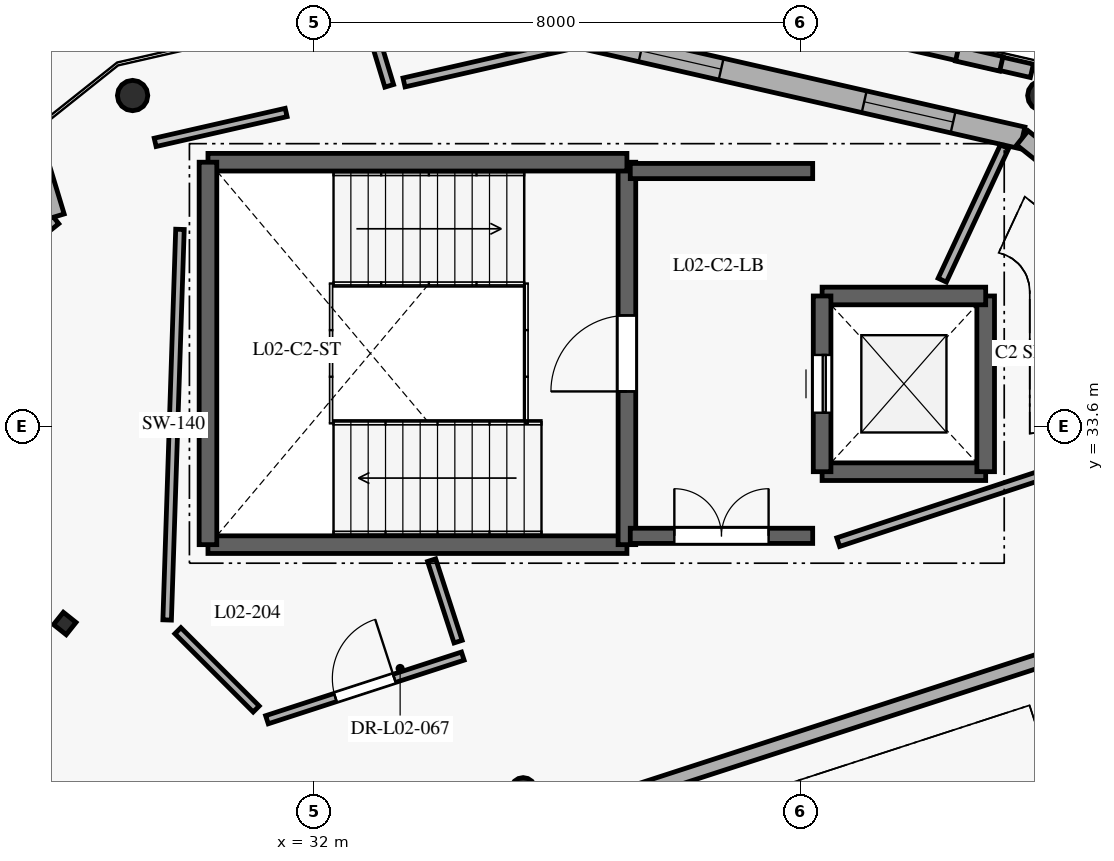
"""IFC4 building model, lengths in metres.
Left out: names, types, materials, properties, quantities, classifications, styles, units other than length and angle.
Written with IfcOpenShell. Run it as: python <this file> out.ifc"""

import sys

from ifc_helpers import new_model, si_unit, direction, frame, frame_2d, origin, origin_2d, place, context, subcontext, project, spatial, rectangle, circle, hollow_circle, i_section, extrude, element, fill, save


model = new_model("IFC4")
c1 = context("Model", 3, precision=1e-05, world=origin(), true_north=direction((0.0, 1.0)))
c2 = subcontext(c1, "Body", "Model", "MODEL_VIEW")
j1 = project(units=[si_unit("LENGTHUNIT", "METRE"), si_unit("PLANEANGLEUNIT", "RADIAN")], contexts=[c1])
p1 = place(None, origin())
s1 = spatial("IfcSite", under=j1, at=p1, CompositionType="ELEMENT")
p2 = place(p1, origin())
s2 = spatial("IfcBuilding", under=s1, at=p2, CompositionType="ELEMENT")
p3 = place(p2, frame((0.0, 0.0, 8.4)))
s3 = spatial("IfcBuildingStorey", under=s2, at=p3, CompositionType="ELEMENT", Elevation=8.4)
p4 = place(p3, frame((35.439, 27.621, 0.0), z_axis=(0.0, 0.0, 1.0), x_axis=(0.951056516295, 0.309016994375, 0.0)))
e1 = element("IfcColumn", 1, at=p4, inside=s3, PredefinedType="COLUMN", context=c2, shape_type="SweptSolid", body=[
    extrude(hollow_circle(Radius=0.203, WallThickness=0.016, at=origin_2d()), origin(), (0.0, 0.0, 1.0), 4.2),
])
for number, where, z_axis, x_axis in (
    (2, (43.985, 39.042, 0.0), (0.0, 0.0, 1.0), (-0.901, 0.434, 0.0)),
    (3, (29.015, 39.042, 0.0), (0.0, 0.0, 1.0), (-0.901, -0.434, 0.0)),
):
    element("IfcColumn", number, at=place(p3, frame(where, z_axis=z_axis, x_axis=x_axis)), inside=s3, PredefinedType="COLUMN", context=c2, shape_type="SweptSolid", body=[
        extrude(circle(Radius=0.25, at=origin_2d()), origin(), (0.0, 0.0, 1.0), 4.2),
    ])
p5 = place(p3, frame((27.9, 30.358, 0.0), z_axis=(0.0, 0.0, 1.0), x_axis=(-0.623470308046, -0.781847027868, 0.0)))
e4 = element("IfcColumn", 4, at=p5, inside=s3, PredefinedType="COLUMN", context=c2, shape_type="SweptSolid", body=[
    extrude(i_section(OverallWidth=0.259, OverallDepth=0.267, WebThickness=0.013, FlangeThickness=0.021, FilletRadius=0.013, at=origin_2d()), origin(), (0.0, 0.0, 1.0), 4.2),
])
p6 = place(p3, frame((23.618, 33.773, 0.0), z_axis=(0.0, 0.0, 1.0), x_axis=(0.781826790272, 0.623495685641, 0.0)))
e5 = element("IfcWall", 5, at=p6, inside=s3, PredefinedType="SOLIDWALL", context=c2, shape_type="SweptSolid", body=[
    extrude(rectangle(XDim=5.241, YDim=0.275, at=frame_2d((2.621, 0.0))), origin(), (0.0, 0.0, 1.0), 3.94),
])
p7 = place(p6, frame((0.35, 0.0, 0.85)))
e6 = element("IfcOpeningElement", 6, at=p7, cuts=e5, PredefinedType="OPENING", context=c2, shape_type="SweptSolid", body=[
    extrude(rectangle(XDim=0.85, YDim=1.4, at=frame_2d((0.425, 0.7))), frame((0.0, 0.147, 0.0), z_axis=(0.0, -1.0, 0.0), x_axis=(1.0, 0.0, 0.0)), (0.0, 0.0, 1.0), 0.295),
])
p8 = place(p3, frame((27.716, 37.041, 0.0), z_axis=(0.0, 0.0, 1.0), x_axis=(-0.290004516903, 0.957025276665, 0.0)))
e7 = element("IfcWall", 7, at=p8, inside=s3, PredefinedType="SOLIDWALL", context=c2, shape_type="SweptSolid", body=[
    extrude(rectangle(XDim=7.062, YDim=0.365, at=frame_2d((3.531, 0.0))), origin(), (0.0, 0.0, 1.0), 3.94),
])
p9 = place(p8, frame((1.115, 0.0, 0.85)))
e8 = element("IfcOpeningElement", 8, at=p9, cuts=e7, PredefinedType="OPENING", context=c2, shape_type="SweptSolid", body=[
    extrude(rectangle(XDim=1.3, YDim=1.8, at=frame_2d((0.65, 0.9))), frame((0.0, 0.192, 0.0), z_axis=(0.0, -1.0, 0.0), x_axis=(1.0, 0.0, 0.0)), (0.0, 0.0, 1.0), 0.385),
])
p10 = place(p8, frame((4.572, 0.0, 0.85)))
e9 = element("IfcOpeningElement", 9, at=p10, cuts=e7, PredefinedType="OPENING", context=c2, shape_type="SweptSolid", body=[
    extrude(rectangle(XDim=1.45, YDim=1.8, at=frame_2d((0.725, 0.9))), frame((0.0, 0.192, 0.0), z_axis=(0.0, -1.0, 0.0), x_axis=(1.0, 0.0, 0.0)), (0.0, 0.0, 1.0), 0.385),
])
p11 = place(p3, frame((36.165, 40.053, 0.0), z_axis=(0.0, 0.0, 1.0), x_axis=(0.974926557855, -0.222526867568, 0.0)))
e10 = element("IfcWall", 10, at=p11, inside=s3, PredefinedType="SOLIDWALL", context=c2, shape_type="SweptSolid", body=[
    extrude(rectangle(XDim=7.677, YDim=0.365, at=frame_2d((3.838, 0.0))), origin(), (0.0, 0.0, 1.0), 3.94),
])
p12 = place(p11, frame((1.244, 0.0, 0.85)))
e11 = element("IfcOpeningElement", 11, at=p12, cuts=e10, PredefinedType="OPENING", context=c2, shape_type="SweptSolid", body=[
    extrude(rectangle(XDim=1.35, YDim=1.6, at=frame_2d((0.675, 0.8))), frame((0.0, 0.192, 0.0), z_axis=(0.0, -1.0, 0.0), x_axis=(1.0, 0.0, 0.0)), (0.0, 0.0, 1.0), 0.385),
])
p13 = place(p11, frame((5.008, 0.0, 0.85)))
e12 = element("IfcOpeningElement", 12, at=p13, cuts=e10, PredefinedType="OPENING", context=c2, shape_type="SweptSolid", body=[
    extrude(rectangle(XDim=1.5, YDim=1.6, at=frame_2d((0.75, 0.8))), frame((0.0, 0.192, 0.0), z_axis=(0.0, -1.0, 0.0), x_axis=(1.0, 0.0, 0.0)), (0.0, 0.0, 1.0), 0.385),
])
p14 = place(p3, frame((43.649, 38.345, 0.0), z_axis=(0.0, 0.0, 1.0), x_axis=(0.781819636461, -0.623504655992, 0.0)))
e13 = element("IfcWall", 13, at=p14, inside=s3, PredefinedType="SOLIDWALL", context=c2, shape_type="SweptSolid", body=[
    extrude(rectangle(XDim=7.333, YDim=0.3, at=frame_2d((3.667, 0.0))), origin(), (0.0, 0.0, 1.0), 3.94),
])
p15 = place(p14, frame((1.008, 0.0, 0.85)))
e14 = element("IfcOpeningElement", 14, at=p15, cuts=e13, PredefinedType="OPENING", context=c2, shape_type="SweptSolid", body=[
    extrude(rectangle(XDim=1.65, YDim=1.6, at=frame_2d((0.825, 0.8))), frame((0.0, 0.16, 0.0), z_axis=(0.0, -1.0, 0.0), x_axis=(1.0, 0.0, 0.0)), (0.0, 0.0, 1.0), 0.32),
])
p16 = place(p14, frame((4.6, 0.0, 0.85)))
e15 = element("IfcOpeningElement", 15, at=p16, cuts=e13, PredefinedType="OPENING", context=c2, shape_type="SweptSolid", body=[
    extrude(rectangle(XDim=1.8, YDim=1.6, at=frame_2d((0.9, 0.8))), frame((0.0, 0.16, 0.0), z_axis=(0.0, -1.0, 0.0), x_axis=(1.0, 0.0, 0.0)), (0.0, 0.0, 1.0), 0.32),
])
p17 = place(p3, frame((43.805, 39.448, 0.0), z_axis=(0.0, 0.0, 1.0), x_axis=(-0.974927395508, 0.222523197641, 0.0)))
e16 = element("IfcWall", 16, at=p17, inside=s3, PredefinedType="ELEMENTEDWALL", context=c2, shape_type="SweptSolid", body=[
    extrude(rectangle(XDim=7.1, YDim=0.225, at=frame_2d((3.55, 0.0))), origin(), (0.0, 0.0, 1.0), 1.09),
])
p18 = place(p3, frame((43.303, 39.562, 1.09), z_axis=(0.0, 0.0, 1.0), x_axis=(-0.974874768559, 0.222753643354, 0.0)))
e17 = element("IfcWall", 17, at=p18, inside=s3, PredefinedType="ELEMENTEDWALL", context=c2, shape_type="SweptSolid", body=[
    extrude(rectangle(XDim=0.745, YDim=0.245, at=frame_2d((0.373, 0.0))), origin(), (0.0, 0.0, 1.0), 2.85),
])
p19 = place(p3, frame((30.255, 31.655, 0.0), z_axis=(0.0, 0.0, 1.0), x_axis=(1.0, 0.0, 0.0)))
e18 = element("IfcWall", 18, at=p19, inside=s3, PredefinedType="SHEAR", context=c2, shape_type="SweptSolid", body=[
    extrude(rectangle(XDim=6.89, YDim=0.29, at=frame_2d((3.445, 0.0))), origin(), (0.0, 0.0, 1.0), 3.95),
])
p20 = place(p3, frame((37.145, 31.655, 0.0), z_axis=(0.0, 0.0, 1.0), x_axis=(0.0, 1.0, 0.0)))
e19 = element("IfcWall", 19, at=p20, inside=s3, PredefinedType="SHEAR", context=c2, shape_type="SweptSolid", body=[
    extrude(rectangle(XDim=6.29, YDim=0.29, at=frame_2d((3.145, 0.0))), origin(), (0.0, 0.0, 1.0), 3.95),
])
p21 = place(p20, frame((2.52, 0.0, 0.0)))
e20 = element("IfcOpeningElement", 20, at=p21, cuts=e19, PredefinedType="OPENING", context=c2, shape_type="SweptSolid", body=[
    extrude(rectangle(XDim=1.25, YDim=2.1, at=frame_2d((0.625, 1.05))), frame((0.0, 0.155, 0.0), z_axis=(0.0, -1.0, 0.0), x_axis=(1.0, 0.0, 0.0)), (0.0, 0.0, 1.0), 0.31),
])
p22 = place(p3, frame((37.145, 37.945, 0.0), z_axis=(0.0, 0.0, 1.0), x_axis=(-1.0, 0.0, 0.0)))
e21 = element("IfcWall", 21, at=p22, inside=s3, PredefinedType="SHEAR", context=c2, shape_type="SweptSolid", body=[
    extrude(rectangle(XDim=6.89, YDim=0.29, at=frame_2d((3.445, 0.0))), origin(), (0.0, 0.0, 1.0), 3.95),
])
p23 = place(p3, frame((30.255, 37.945, 0.0), z_axis=(0.0, 0.0, 1.0), x_axis=(0.0, -1.0, 0.0)))
e22 = element("IfcWall", 22, at=p23, inside=s3, PredefinedType="SHEAR", context=c2, shape_type="SweptSolid", body=[
    extrude(rectangle(XDim=6.29, YDim=0.29, at=frame_2d((3.145, 0.0))), origin(), (0.0, 0.0, 1.0), 3.95),
])
p24 = place(p3, frame((40.355, 32.855, 0.0), z_axis=(0.0, 0.0, 1.0), x_axis=(1.0, 0.0, 0.0)))
e23 = element("IfcWall", 23, at=p24, inside=s3, PredefinedType="SHEAR", context=c2, shape_type="SweptSolid", body=[
    extrude(rectangle(XDim=2.69, YDim=0.29, at=frame_2d((1.345, 0.0))), origin(), (0.0, 0.0, 1.0), 3.95),
])
p25 = place(p3, frame((43.045, 32.855, 0.0), z_axis=(0.0, 0.0, 1.0), x_axis=(0.0, 1.0, 0.0)))
e24 = element("IfcWall", 24, at=p25, inside=s3, PredefinedType="SHEAR", context=c2, shape_type="SweptSolid", body=[
    extrude(rectangle(XDim=2.89, YDim=0.29, at=frame_2d((1.445, 0.0))), origin(), (0.0, 0.0, 1.0), 3.95),
])
p26 = place(p3, frame((43.045, 35.745, 0.0), z_axis=(0.0, 0.0, 1.0), x_axis=(-1.0, 0.0, 0.0)))
e25 = element("IfcWall", 25, at=p26, inside=s3, PredefinedType="SHEAR", context=c2, shape_type="SweptSolid", body=[
    extrude(rectangle(XDim=2.69, YDim=0.29, at=frame_2d((1.345, 0.0))), origin(), (0.0, 0.0, 1.0), 3.95),
])
p27 = place(p3, frame((40.355, 35.745, 0.0), z_axis=(0.0, 0.0, 1.0), x_axis=(0.0, -1.0, 0.0)))
e26 = element("IfcWall", 26, at=p27, inside=s3, PredefinedType="SHEAR", context=c2, shape_type="SweptSolid", body=[
    extrude(rectangle(XDim=2.89, YDim=0.29, at=frame_2d((1.445, 0.0))), origin(), (0.0, 0.0, 1.0), 3.95),
])
p28 = place(p27, frame((0.97, 0.0, 0.0)))
e27 = element("IfcOpeningElement", 27, at=p28, cuts=e26, PredefinedType="OPENING", context=c2, shape_type="SweptSolid", body=[
    extrude(rectangle(XDim=0.95, YDim=2.1, at=frame_2d((0.475, 1.05))), frame((0.0, 0.155, 0.0), z_axis=(0.0, -1.0, 0.0), x_axis=(1.0, 0.0, 0.0)), (0.0, 0.0, 1.0), 0.31),
])
p29 = place(p3, frame((37.2, 31.8, 0.0), z_axis=(0.0, 0.0, 1.0), x_axis=(1.0, 0.0, 0.0)))
e28 = element("IfcWall", 28, at=p29, inside=s3, PredefinedType="SHEAR", context=c2, shape_type="SweptSolid", body=[
    extrude(rectangle(XDim=3.0, YDim=0.25, at=frame_2d((1.5, 0.0))), origin(), (0.0, 0.0, 1.0), 3.95),
])
p30 = place(p29, frame((0.725, 0.0, 0.0)))
e29 = element("IfcOpeningElement", 29, at=p30, cuts=e28, PredefinedType="OPENING", context=c2, shape_type="SweptSolid", body=[
    extrude(rectangle(XDim=1.55, YDim=2.15, at=frame_2d((0.775, 1.075))), frame((0.0, 0.135, 0.0), z_axis=(0.0, -1.0, 0.0), x_axis=(1.0, 0.0, 0.0)), (0.0, 0.0, 1.0), 0.27),
])
p31 = place(p3, frame((40.2, 37.8, 0.0), z_axis=(0.0, 0.0, 1.0), x_axis=(-1.0, 0.0, 0.0)))
e30 = element("IfcWall", 30, at=p31, inside=s3, PredefinedType="SHEAR", context=c2, shape_type="SweptSolid", body=[
    extrude(rectangle(XDim=3.0, YDim=0.25, at=frame_2d((1.5, 0.0))), origin(), (0.0, 0.0, 1.0), 3.95),
])
p32 = place(p3, frame((43.946, 29.754, 0.0), z_axis=(0.0, 0.0, 1.0), x_axis=(-0.951056101214, -0.309018271859, 0.0)))
e31 = element("IfcWall", 31, at=p32, inside=s3, PredefinedType="PARTITIONING", context=c2, shape_type="SweptSolid", body=[
    extrude(rectangle(XDim=17.75, YDim=0.225, at=frame_2d((8.875, 0.0))), origin(), (0.0, 0.0, 1.0), 3.95),
])
p33 = place(p3, frame((43.354, 38.2, 0.0), z_axis=(0.0, 0.0, 1.0), x_axis=(-0.422526683329, -0.906350485119, 0.0)))
e32 = element("IfcWall", 32, at=p33, inside=s3, PredefinedType="PARTITIONING", context=c2, shape_type="SweptSolid", body=[
    extrude(rectangle(XDim=2.422, YDim=0.15, at=frame_2d((1.211, 0.0))), origin(), (0.0, 0.0, 1.0), 3.93),
])
p34 = place(p3, frame((40.62, 31.696, 0.0), z_axis=(0.0, 0.0, 1.0), x_axis=(0.949660752523, 0.313280154363, 0.0)))
e33 = element("IfcWall", 33, at=p34, inside=s3, PredefinedType="PARTITIONING", context=c2, shape_type="SweptSolid", body=[
    extrude(rectangle(XDim=3.779, YDim=0.15, at=frame_2d((1.889, 0.0))), origin(), (0.0, 0.0, 1.0), 3.93),
])
p35 = place(p3, frame((31.225, 28.775, 0.0), z_axis=(0.0, 0.0, 1.0), x_axis=(0.951056314451, 0.309017615587, 0.0)))
e34 = element("IfcWall", 34, at=p35, inside=s3, PredefinedType="PLUMBINGWALL", context=c2, shape_type="SweptSolid", body=[
    extrude(rectangle(XDim=3.387, YDim=0.14, at=frame_2d((1.693, 0.0))), origin(), (0.0, 0.0, 1.0), 3.93),
])
p36 = place(p35, frame((1.184, 0.0, 0.0)))
e35 = element("IfcOpeningElement", 35, at=p36, cuts=e34, PredefinedType="OPENING", context=c2, shape_type="SweptSolid", body=[
    extrude(rectangle(XDim=1.02, YDim=2.06, at=frame_2d((0.51, 1.03))), frame((0.0, 0.08, 0.0), z_axis=(0.0, -1.0, 0.0), x_axis=(1.0, 0.0, 0.0)), (0.0, 0.0, 1.0), 0.16),
])
p37 = place(p3, frame((34.369, 30.06, 0.0), z_axis=(0.0, 0.0, 1.0), x_axis=(-0.30909782547, 0.951030248883, 0.0)))
e36 = element("IfcWall", 36, at=p37, inside=s3, PredefinedType="PLUMBINGWALL", context=c2, shape_type="SweptSolid", body=[
    extrude(rectangle(XDim=1.409, YDim=0.14, at=frame_2d((0.705, 0.0))), origin(), (0.0, 0.0, 1.0), 3.93),
])
p38 = place(p3, frame((31.541, 38.763, 0.0), z_axis=(0.0, 0.0, 1.0), x_axis=(-0.974922930025, -0.222542761087, 0.0)))
e37 = element("IfcWall", 37, at=p38, inside=s3, PredefinedType="PLUMBINGWALL", context=c2, shape_type="SweptSolid", body=[
    extrude(rectangle(XDim=2.209, YDim=0.14, at=frame_2d((1.105, 0.0))), origin(), (0.0, 0.0, 1.0), 3.93),
])
p39 = place(p3, frame((29.794, 36.841, 0.0), z_axis=(0.0, 0.0, 1.0), x_axis=(-0.032816547949, -0.999461392041, 0.0)))
e38 = element("IfcWall", 38, at=p39, inside=s3, PredefinedType="PLUMBINGWALL", context=c2, shape_type="SweptSolid", body=[
    extrude(rectangle(XDim=6.428, YDim=0.14, at=frame_2d((3.214, 0.0))), origin(), (0.0, 0.0, 1.0), 3.93),
])
p40 = place(p3, frame((29.76, 30.24, 0.0), z_axis=(0.0, 0.0, 1.0), x_axis=(0.707106781187, -0.707106781187, 0.0)))
e39 = element("IfcWall", 39, at=p40, inside=s3, PredefinedType="PLUMBINGWALL", context=c2, shape_type="SweptSolid", body=[
    extrude(rectangle(XDim=1.821, YDim=0.14, at=frame_2d((0.911, 0.0))), origin(), (0.0, 0.0, 1.0), 3.93),
])
p41 = place(p3, frame((21.365, 78.365, 0.0), z_axis=(0.0, 0.0, 1.0), x_axis=(0.290089355637, -0.95699956413, 0.0)))
e40 = element("IfcWall", 40, at=p41, inside=s3, PredefinedType="PARTITIONING", context=c2, shape_type="SweptSolid", body=[
    extrude(rectangle(XDim=40.923, YDim=0.15, at=frame_2d((20.461, 0.0))), origin(), (0.0, 0.0, 1.0), 3.93),
])
p42 = place(p41, frame((19.922, 0.0, 0.0)))
e41 = element("IfcOpeningElement", 41, at=p42, cuts=e40, PredefinedType="OPENING", context=c2, shape_type="SweptSolid", body=[
    extrude(rectangle(XDim=1.08, YDim=2.12, at=frame_2d((0.54, 1.06))), frame((0.0, 0.085, 0.0), z_axis=(0.0, -1.0, 0.0), x_axis=(1.0, 0.0, 0.0)), (0.0, 0.0, 1.0), 0.17),
])
p43 = place(p3, frame((33.479, 39.257, 0.0), z_axis=(0.0, 0.0, 1.0), x_axis=(0.97491998307, 0.222555670812, 0.0)))
e42 = element("IfcWall", 42, at=p43, inside=s3, PredefinedType="PARTITIONING", context=c2, shape_type="SweptSolid", body=[
    extrude(rectangle(XDim=2.709, YDim=0.15, at=frame_2d((1.355, 0.0))), origin(), (0.0, 0.0, 1.0), 3.93),
])
p44 = place(p12, origin())
e43 = element("IfcWindow", 43, at=p44, inside=s3, PartitioningType="SINGLE_PANEL", PredefinedType="WINDOW", context=c2, shape_type="SweptSolid", body=[
    extrude(rectangle(XDim=1.35, YDim=1.6, at=frame_2d((0.675, 0.8))), frame((0.0, 0.03, 0.0), z_axis=(0.0, -1.0, 0.0), x_axis=(1.0, 0.0, 0.0)), (0.0, 0.0, 1.0), 0.06),
])
fill(e11, e43)
p45 = place(p13, origin())
e44 = element("IfcWindow", 44, at=p45, inside=s3, PartitioningType="SINGLE_PANEL", PredefinedType="WINDOW", context=c2, shape_type="SweptSolid", body=[
    extrude(rectangle(XDim=1.5, YDim=1.6, at=frame_2d((0.75, 0.8))), frame((0.0, 0.03, 0.0), z_axis=(0.0, -1.0, 0.0), x_axis=(1.0, 0.0, 0.0)), (0.0, 0.0, 1.0), 0.06),
])
fill(e12, e44)
p46 = place(p21, origin())
e45 = element("IfcDoor", 45, at=p46, inside=s3, OperationType="SINGLE_SWING_LEFT", PredefinedType="DOOR", context=c2, shape_type="SweptSolid", body=[
    extrude(rectangle(XDim=1.25, YDim=2.1, at=frame_2d((0.625, 1.05))), frame((0.0, 0.025, 0.0), z_axis=(0.0, -1.0, 0.0), x_axis=(1.0, 0.0, 0.0)), (0.0, 0.0, 1.0), 0.05),
])
fill(e20, e45)
p47 = place(p28, frame((0.95, 0.0, 0.0), z_axis=(0.0, 0.0, 1.0), x_axis=(-1.0, 0.0, 0.0)))
e46 = element("IfcDoor", 46, at=p47, inside=s3, OperationType="SLIDING_TO_LEFT", PredefinedType="DOOR", context=c2, shape_type="SweptSolid", body=[
    extrude(rectangle(XDim=0.95, YDim=2.1, at=frame_2d((0.475, 1.05))), frame((0.0, 0.025, 0.0), z_axis=(0.0, -1.0, 0.0), x_axis=(1.0, 0.0, 0.0)), (0.0, 0.0, 1.0), 0.05),
])
fill(e27, e46)
p48 = place(p30, origin())
e47 = element("IfcDoor", 47, at=p48, inside=s3, OperationType="DOUBLE_DOOR_SINGLE_SWING", PredefinedType="DOOR", context=c2, shape_type="SweptSolid", body=[
    extrude(rectangle(XDim=1.55, YDim=2.15, at=frame_2d((0.775, 1.075))), frame((0.0, 0.025, 0.0), z_axis=(0.0, -1.0, 0.0), x_axis=(1.0, 0.0, 0.0)), (0.0, 0.0, 1.0), 0.05),
])
fill(e29, e47)
p49 = place(p36, frame((1.02, 0.0, 0.0), z_axis=(0.0, 0.0, 1.0), x_axis=(-1.0, 0.0, 0.0)))
e48 = element("IfcDoor", 48, at=p49, inside=s3, OperationType="SINGLE_SWING_RIGHT", PredefinedType="DOOR", context=c2, shape_type="SweptSolid", body=[
    extrude(rectangle(XDim=1.02, YDim=2.06, at=frame_2d((0.51, 1.03))), frame((0.0, 0.025, 0.0), z_axis=(0.0, -1.0, 0.0), x_axis=(1.0, 0.0, 0.0)), (0.0, 0.0, 1.0), 0.05),
])
fill(e35, e48)
save(model, sys.argv[1])
